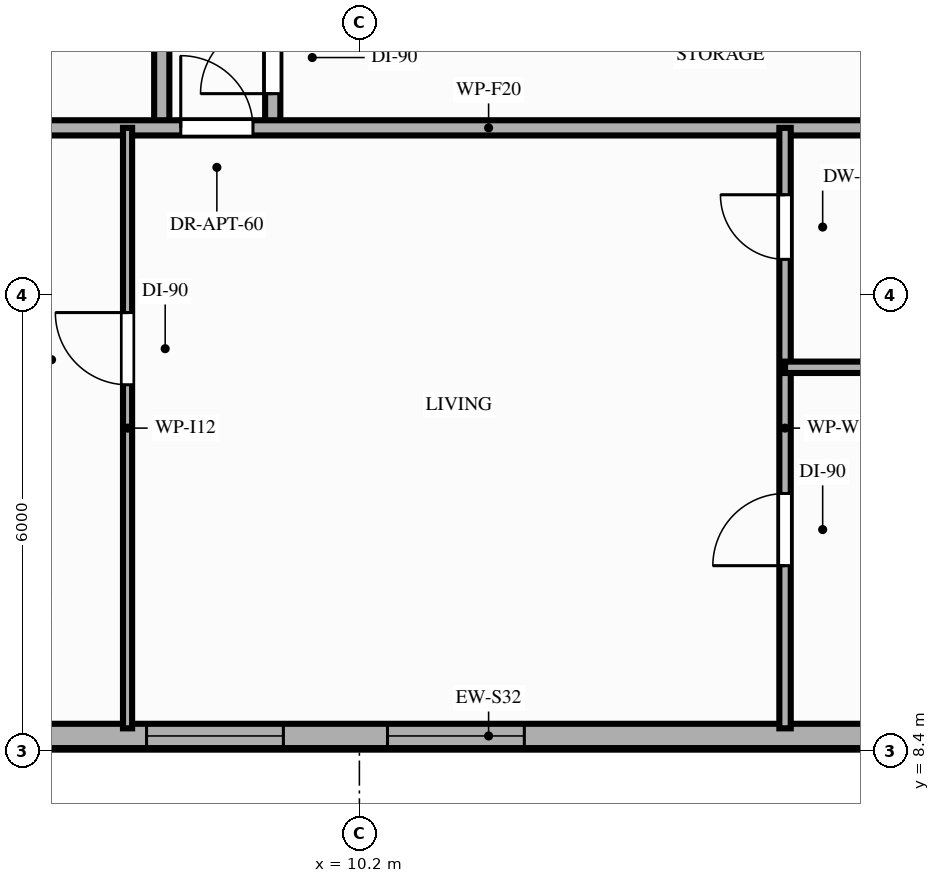
"""IFC4 building model, lengths in metres.
Left out: names, types, materials, properties, quantities, classifications, styles, units other than length and angle.
Written with IfcOpenShell. Run it as: python <this file> out.ifc"""

import sys

from ifc_helpers import new_model, si_unit, direction, frame, frame_2d, origin, place, context, subcontext, project, spatial, rectangle, extrude, element, fill, save


model = new_model("IFC4")
c1 = context("Model", 3, precision=1e-05, world=origin(), true_north=direction((0.0, 1.0)))
c2 = subcontext(c1, "Body", "Model", "MODEL_VIEW")
j1 = project(units=[si_unit("LENGTHUNIT", "METRE"), si_unit("PLANEANGLEUNIT", "RADIAN")], contexts=[c1])
p1 = place(None, origin())
s1 = spatial("IfcSite", under=j1, at=p1, CompositionType="ELEMENT")
p2 = place(p1, origin())
s2 = spatial("IfcBuilding", under=s1, at=p2, CompositionType="ELEMENT")
p3 = place(p2, frame((0.0, 0.0, 86.6)))
s3 = spatial("IfcBuildingStorey", under=s2, at=p3, CompositionType="ELEMENT", Elevation=86.6)
p4 = place(p3, frame((4.0, 8.6, 0.0), z_axis=(0.0, 0.0, 1.0), x_axis=(1.0, 0.0, 0.0)))
e1 = element("IfcWall", 1, at=p4, inside=s3, PredefinedType="STANDARD", context=c2, shape_type="SweptSolid", body=[
    extrude(rectangle(XDim=15.8, YDim=0.32, at=frame_2d((7.9, 0.0))), origin(), (0.0, 0.0, 1.0), 3.02),
])
p5 = place(p4, frame((6.57, 0.0, 0.85)))
e2 = element("IfcOpeningElement", 2, at=p5, cuts=e1, PredefinedType="OPENING", context=c2, shape_type="SweptSolid", body=[
    extrude(rectangle(XDim=1.8, YDim=1.75, at=frame_2d((0.9, 0.875))), frame((0.0, 0.17, 0.0), z_axis=(0.0, -1.0, 0.0), x_axis=(1.0, 0.0, 0.0)), (0.0, 0.0, 1.0), 0.34),
])
p6 = place(p4, frame((3.4, 0.0, 0.85)))
e3 = element("IfcOpeningElement", 3, at=p6, cuts=e1, PredefinedType="OPENING", context=c2, shape_type="SweptSolid", body=[
    extrude(rectangle(XDim=1.8, YDim=1.75, at=frame_2d((0.9, 0.875))), frame((0.0, 0.17, 0.0), z_axis=(0.0, -1.0, 0.0), x_axis=(1.0, 0.0, 0.0)), (0.0, 0.0, 1.0), 0.34),
])
p7 = place(p3, frame((7.6, 16.6, 0.0), z_axis=(0.0, 0.0, 1.0), x_axis=(0.0, 1.0, 0.0)))
e4 = element("IfcWall", 4, at=p7, inside=s3, PredefinedType="PARTITIONING", context=c2, shape_type="SweptSolid", body=[
    extrude(rectangle(XDim=11.5, YDim=0.2, at=frame_2d((5.75, 0.0))), origin(), (0.0, 0.0, 1.0), 2.4),
])
p8 = place(p7, frame((1.07, 0.0, 0.0)))
e5 = element("IfcOpeningElement", 5, at=p8, cuts=e4, PredefinedType="OPENING", context=c2, shape_type="SweptSolid", body=[
    extrude(rectangle(XDim=0.95, YDim=2.15, at=frame_2d((0.475, 1.075))), frame((0.0, 0.11, 0.0), z_axis=(0.0, -1.0, 0.0), x_axis=(1.0, 0.0, 0.0)), (0.0, 0.0, 1.0), 0.22),
])
p9 = place(p7, frame((4.58, 0.0, 0.0)))
e6 = element("IfcOpeningElement", 6, at=p9, cuts=e4, PredefinedType="OPENING", context=c2, shape_type="SweptSolid", body=[
    extrude(rectangle(XDim=0.95, YDim=2.15, at=frame_2d((0.475, 1.075))), frame((0.0, 0.11, 0.0), z_axis=(0.0, -1.0, 0.0), x_axis=(1.0, 0.0, 0.0)), (0.0, 0.0, 1.0), 0.22),
])
p10 = place(p7, frame((8.78, 0.0, 0.0)))
e7 = element("IfcOpeningElement", 7, at=p10, cuts=e4, PredefinedType="OPENING", context=c2, shape_type="SweptSolid", body=[
    extrude(rectangle(XDim=0.95, YDim=2.15, at=frame_2d((0.475, 1.075))), frame((0.0, 0.11, 0.0), z_axis=(0.0, -1.0, 0.0), x_axis=(1.0, 0.0, 0.0)), (0.0, 0.0, 1.0), 0.22),
])
p11 = place(p3, frame((9.06, 16.6, 0.0), z_axis=(0.0, 0.0, 1.0), x_axis=(0.0, 1.0, 0.0)))
e8 = element("IfcWall", 8, at=p11, inside=s3, PredefinedType="PARTITIONING", context=c2, shape_type="SweptSolid", body=[
    extrude(rectangle(XDim=11.5, YDim=0.2, at=frame_2d((5.75, 0.0))), origin(), (0.0, 0.0, 1.0), 2.4),
])
p12 = place(p11, frame((0.45, 0.0, 0.0)))
e9 = element("IfcOpeningElement", 9, at=p12, cuts=e8, PredefinedType="OPENING", context=c2, shape_type="SweptSolid", body=[
    extrude(rectangle(XDim=0.95, YDim=2.15, at=frame_2d((0.475, 1.075))), frame((0.0, 0.11, 0.0), z_axis=(0.0, -1.0, 0.0), x_axis=(1.0, 0.0, 0.0)), (0.0, 0.0, 1.0), 0.22),
])
p13 = place(p11, frame((2.08, 0.0, 0.0)))
e10 = element("IfcOpeningElement", 10, at=p13, cuts=e8, PredefinedType="OPENING", context=c2, shape_type="SweptSolid", body=[
    extrude(rectangle(XDim=0.95, YDim=2.1, at=frame_2d((0.475, 1.05))), frame((0.0, 0.11, 0.0), z_axis=(0.0, -1.0, 0.0), x_axis=(1.0, 0.0, 0.0)), (0.0, 0.0, 1.0), 0.22),
])
p14 = place(p11, frame((8.6, 0.0, 0.0)))
e11 = element("IfcOpeningElement", 11, at=p14, cuts=e8, PredefinedType="OPENING", context=c2, shape_type="SweptSolid", body=[
    extrude(rectangle(XDim=0.95, YDim=2.15, at=frame_2d((0.475, 1.075))), frame((0.0, 0.11, 0.0), z_axis=(0.0, -1.0, 0.0), x_axis=(1.0, 0.0, 0.0)), (0.0, 0.0, 1.0), 0.22),
])
p15 = place(p11, frame((5.43, 0.0, 0.0)))
e12 = element("IfcOpeningElement", 12, at=p15, cuts=e8, PredefinedType="OPENING", context=c2, shape_type="SweptSolid", body=[
    extrude(rectangle(XDim=0.95, YDim=2.15, at=frame_2d((0.475, 1.075))), frame((0.0, 0.11, 0.0), z_axis=(0.0, -1.0, 0.0), x_axis=(1.0, 0.0, 0.0)), (0.0, 0.0, 1.0), 0.22),
])
p16 = place(p3, frame((3.9, 16.6, 0.0), z_axis=(0.0, 0.0, 1.0), x_axis=(1.0, 0.0, 0.0)))
e13 = element("IfcWall", 13, at=p16, inside=s3, PredefinedType="PARTITIONING", context=c2, shape_type="SweptSolid", body=[
    extrude(rectangle(XDim=16.0, YDim=0.2, at=frame_2d((8.0, 0.0))), origin(), (0.0, 0.0, 1.0), 2.4),
])
p17 = place(p16, frame((3.95, 0.0, 0.0)))
e14 = element("IfcOpeningElement", 14, at=p17, cuts=e13, PredefinedType="OPENING", context=c2, shape_type="SweptSolid", body=[
    extrude(rectangle(XDim=0.95, YDim=2.15, at=frame_2d((0.475, 1.075))), frame((0.0, 0.11, 0.0), z_axis=(0.0, -1.0, 0.0), x_axis=(1.0, 0.0, 0.0)), (0.0, 0.0, 1.0), 0.22),
])
p18 = place(p3, frame((7.15, 8.7, 0.0), z_axis=(0.0, 0.0, 1.0), x_axis=(0.0, 1.0, 0.0)))
e15 = element("IfcWall", 15, at=p18, inside=s3, PredefinedType="PARTITIONING", context=c2, shape_type="SweptSolid", body=[
    extrude(rectangle(XDim=7.9, YDim=0.12, at=frame_2d((3.95, 0.0))), origin(), (0.0, 0.0, 1.0), 2.4),
])
p19 = place(p18, frame((4.52, 0.0, 0.0)))
e16 = element("IfcOpeningElement", 16, at=p19, cuts=e15, PredefinedType="OPENING", context=c2, shape_type="SweptSolid", body=[
    extrude(rectangle(XDim=0.95, YDim=2.15, at=frame_2d((0.475, 1.075))), frame((0.0, 0.07, 0.0), z_axis=(0.0, -1.0, 0.0), x_axis=(1.0, 0.0, 0.0)), (0.0, 0.0, 1.0), 0.14),
])
p20 = place(p3, frame((15.8, 8.7, 0.0), z_axis=(0.0, 0.0, 1.0), x_axis=(0.0, 1.0, 0.0)))
e17 = element("IfcWall", 17, at=p20, inside=s3, PredefinedType="PARTITIONING", context=c2, shape_type="SweptSolid", body=[
    extrude(rectangle(XDim=7.9, YDim=0.15, at=frame_2d((3.95, 0.0))), origin(), (0.0, 0.0, 1.0), 2.4),
])
p21 = place(p20, frame((2.14, 0.0, 0.0)))
e18 = element("IfcOpeningElement", 18, at=p21, cuts=e17, PredefinedType="OPENING", context=c2, shape_type="SweptSolid", body=[
    extrude(rectangle(XDim=0.95, YDim=2.15, at=frame_2d((0.475, 1.075))), frame((0.0, 0.085, 0.0), z_axis=(0.0, -1.0, 0.0), x_axis=(1.0, 0.0, 0.0)), (0.0, 0.0, 1.0), 0.17),
])
p22 = place(p20, frame((6.17, 0.0, 0.0)))
e19 = element("IfcOpeningElement", 19, at=p22, cuts=e17, PredefinedType="OPENING", context=c2, shape_type="SweptSolid", body=[
    extrude(rectangle(XDim=0.85, YDim=2.1, at=frame_2d((0.425, 1.05))), frame((0.0, 0.085, 0.0), z_axis=(0.0, -1.0, 0.0), x_axis=(1.0, 0.0, 0.0)), (0.0, 0.0, 1.0), 0.17),
])
p23 = place(p3, frame((15.8, 13.45, 0.0), z_axis=(0.0, 0.0, 1.0), x_axis=(1.0, 0.0, 0.0)))
e20 = element("IfcWall", 20, at=p23, inside=s3, PredefinedType="PARTITIONING", context=c2, shape_type="SweptSolid", body=[
    extrude(rectangle(XDim=4.1, YDim=0.15, at=frame_2d((2.05, 0.0))), origin(), (0.0, 0.0, 1.0), 2.4),
])
p24 = place(p5, origin())
e21 = element("IfcWindow", 21, at=p24, inside=s3, PartitioningType="SINGLE_PANEL", PredefinedType="WINDOW", context=c2, shape_type="SweptSolid", body=[
    extrude(rectangle(XDim=1.8, YDim=1.75, at=frame_2d((0.9, 0.875))), frame((0.0, 0.03, 0.0), z_axis=(0.0, -1.0, 0.0), x_axis=(1.0, 0.0, 0.0)), (0.0, 0.0, 1.0), 0.06),
])
fill(e2, e21)
p25 = place(p6, origin())
e22 = element("IfcWindow", 22, at=p25, inside=s3, PartitioningType="SINGLE_PANEL", PredefinedType="WINDOW", context=c2, shape_type="SweptSolid", body=[
    extrude(rectangle(XDim=1.8, YDim=1.75, at=frame_2d((0.9, 0.875))), frame((0.0, 0.03, 0.0), z_axis=(0.0, -1.0, 0.0), x_axis=(1.0, 0.0, 0.0)), (0.0, 0.0, 1.0), 0.06),
])
fill(e3, e22)
p26 = place(p17, origin())
e23 = element("IfcDoor", 23, at=p26, inside=s3, OperationType="SINGLE_SWING_LEFT", PredefinedType="DOOR", context=c2, shape_type="SweptSolid", body=[
    extrude(rectangle(XDim=0.95, YDim=2.15, at=frame_2d((0.475, 1.075))), frame((0.0, 0.025, 0.0), z_axis=(0.0, -1.0, 0.0), x_axis=(1.0, 0.0, 0.0)), (0.0, 0.0, 1.0), 0.05),
])
fill(e14, e23)
p27 = place(p19, origin())
e24 = element("IfcDoor", 24, at=p27, inside=s3, OperationType="SINGLE_SWING_RIGHT", PredefinedType="DOOR", context=c2, shape_type="SweptSolid", body=[
    extrude(rectangle(XDim=0.95, YDim=2.15, at=frame_2d((0.475, 1.075))), frame((0.0, 0.025, 0.0), z_axis=(0.0, -1.0, 0.0), x_axis=(1.0, 0.0, 0.0)), (0.0, 0.0, 1.0), 0.05),
])
fill(e16, e24)
p28 = place(p21, origin())
e25 = element("IfcDoor", 25, at=p28, inside=s3, OperationType="SINGLE_SWING_LEFT", PredefinedType="DOOR", context=c2, shape_type="SweptSolid", body=[
    extrude(rectangle(XDim=0.95, YDim=2.15, at=frame_2d((0.475, 1.075))), frame((0.0, 0.025, 0.0), z_axis=(0.0, -1.0, 0.0), x_axis=(1.0, 0.0, 0.0)), (0.0, 0.0, 1.0), 0.05),
])
fill(e18, e25)
p29 = place(p22, origin())
e26 = element("IfcDoor", 26, at=p29, inside=s3, OperationType="SINGLE_SWING_RIGHT", PredefinedType="DOOR", context=c2, shape_type="SweptSolid", body=[
    extrude(rectangle(XDim=0.85, YDim=2.1, at=frame_2d((0.425, 1.05))), frame((0.0, 0.025, 0.0), z_axis=(0.0, -1.0, 0.0), x_axis=(1.0, 0.0, 0.0)), (0.0, 0.0, 1.0), 0.05),
])
fill(e19, e26)
p30 = place(p12, origin())
e27 = element("IfcDoor", 27, at=p30, inside=s3, OperationType="SINGLE_SWING_LEFT", PredefinedType="DOOR", context=c2, shape_type="SweptSolid", body=[
    extrude(rectangle(XDim=0.95, YDim=2.15, at=frame_2d((0.475, 1.075))), frame((0.0, 0.025, 0.0), z_axis=(0.0, -1.0, 0.0), x_axis=(1.0, 0.0, 0.0)), (0.0, 0.0, 1.0), 0.05),
])
fill(e9, e27)
save(model, sys.argv[1])
